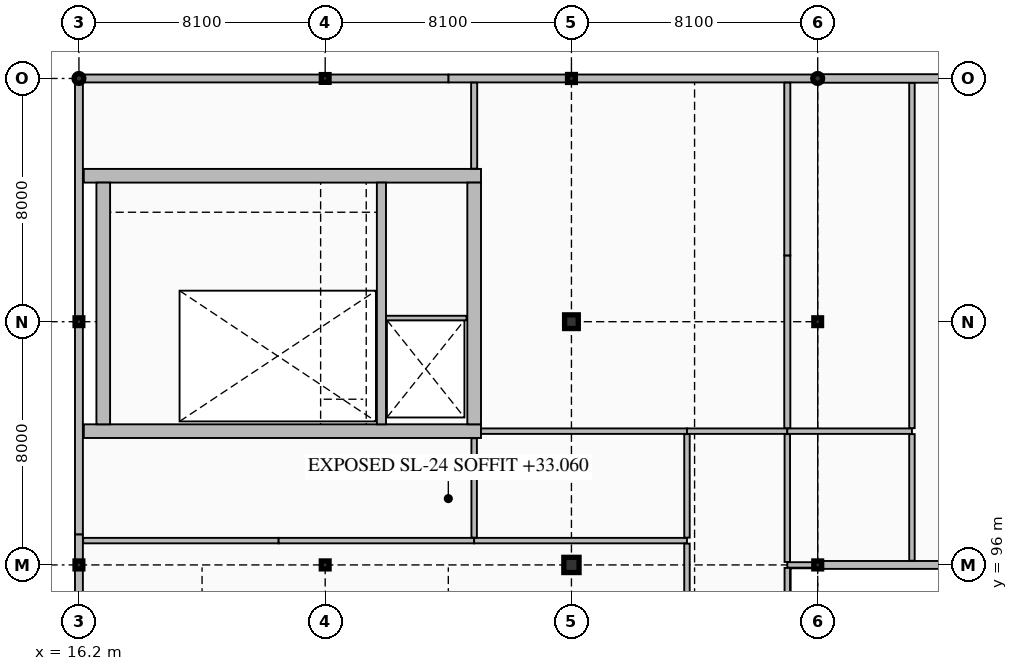
"""IFC4 building model, lengths in metres.
Left out: names, types, materials, properties, quantities, classifications, styles, units other than length and angle.
Written with IfcOpenShell. Run it as: python <this file> out.ifc"""

import sys

from ifc_helpers import new_model, si_unit, direction, frame, frame_2d, origin, origin_2d, place, context, subcontext, project, spatial, rectangle, hollow_rectangle, hollow_circle, i_section, extrude, element, fill, save


model = new_model("IFC4")
c1 = context("Model", 3, precision=1e-05, world=origin(), true_north=direction((0.0, 1.0)))
c2 = subcontext(c1, "Body", "Model", "MODEL_VIEW")
j1 = project(units=[si_unit("LENGTHUNIT", "METRE"), si_unit("PLANEANGLEUNIT", "RADIAN")], contexts=[c1])
p1 = place(None, origin())
s1 = spatial("IfcSite", under=j1, at=p1, CompositionType="ELEMENT")
p2 = place(p1, origin())
s2 = spatial("IfcBuilding", under=s1, at=p2, CompositionType="ELEMENT")
p3 = place(p2, frame((0.0, 0.0, 29.1)))
s3 = spatial("IfcBuildingStorey", under=s2, at=p3, CompositionType="ELEMENT", Elevation=29.1)
p4 = place(p3, frame((16.36, 100.4, 0.0), z_axis=(0.0, 0.0, 1.0), x_axis=(1.0, 0.0, 0.0)))
e1 = element("IfcWall", 1, at=p4, inside=s3, PredefinedType="SHEAR", context=c2, shape_type="SweptSolid", body=[
    extrude(rectangle(XDim=13.065, YDim=0.45, at=frame_2d((6.532, 0.0))), origin(), (0.0, 0.0, 1.0), 4.2),
])
p5 = place(p4, frame((1.39, 0.0, 0.0)))
e2 = element("IfcOpeningElement", 2, at=p5, cuts=e1, PredefinedType="OPENING", context=c2, shape_type="SweptSolid", body=[
    extrude(rectangle(XDim=1.15, YDim=2.25, at=frame_2d((0.575, 1.125))), frame((0.0, 0.235, 0.0), z_axis=(0.0, -1.0, 0.0), x_axis=(1.0, 0.0, 0.0)), (0.0, 0.0, 1.0), 0.47),
])
p6 = place(p4, frame((10.695, 0.0, 0.0)))
e3 = element("IfcOpeningElement", 3, at=p6, cuts=e1, PredefinedType="OPENING", context=c2, shape_type="SweptSolid", body=[
    extrude(rectangle(XDim=1.1, YDim=2.2, at=frame_2d((0.55, 1.1))), frame((0.0, 0.235, 0.0), z_axis=(0.0, -1.0, 0.0), x_axis=(1.0, 0.0, 0.0)), (0.0, 0.0, 1.0), 0.47),
])
p7 = place(p3, frame((16.36, 108.8, 0.0), z_axis=(0.0, 0.0, 1.0), x_axis=(1.0, 0.0, 0.0)))
e4 = element("IfcWall", 4, at=p7, inside=s3, PredefinedType="SHEAR", context=c2, shape_type="SweptSolid", body=[
    extrude(rectangle(XDim=13.065, YDim=0.45, at=frame_2d((6.532, 0.0))), origin(), (0.0, 0.0, 1.0), 4.2),
])
for number, where, z_axis, x_axis in (
    (5, (17.0, 100.625, 0.0), (0.0, 0.0, 1.0), (0.0, 1.0, 0.0)),
    (6, (29.2, 100.625, 0.0), (0.0, 0.0, 1.0), (0.0, 1.0, 0.0)),
):
    element("IfcWall", number, at=place(p3, frame(where, z_axis=z_axis, x_axis=x_axis)), inside=s3, PredefinedType="SHEAR", context=c2, shape_type="SweptSolid", body=[
        extrude(rectangle(XDim=7.95, YDim=0.45, at=frame_2d((3.975, 0.0))), origin(), (0.0, 0.0, 1.0), 4.2),
    ])
p8 = place(p3, frame((26.15, 100.625, 0.0), z_axis=(0.0, 0.0, 1.0), x_axis=(0.0, 1.0, 0.0)))
e7 = element("IfcWall", 7, at=p8, inside=s3, PredefinedType="SHEAR", context=c2, shape_type="SweptSolid", body=[
    extrude(rectangle(XDim=7.95, YDim=0.3, at=frame_2d((3.975, 0.0))), origin(), (0.0, 0.0, 1.0), 4.2),
])
p9 = place(p3, frame((16.2, 96.0, 0.0), z_axis=(0.0, 0.0, 1.0), x_axis=(1.0, 0.0, 0.0)))
e8 = element("IfcColumn", 8, at=p9, inside=s3, PredefinedType="COLUMN", context=c2, shape_type="SweptSolid", body=[
    extrude(i_section(OverallWidth=0.256, OverallDepth=0.26, WebThickness=0.011, FlangeThickness=0.017, FilletRadius=0.013, at=origin_2d()), origin(), (0.0, 0.0, 1.0), 4.2),
])
p10 = place(p3, frame((16.2, 104.0, 0.0), z_axis=(0.0, 0.0, 1.0), x_axis=(1.0, 0.0, 0.0)))
e9 = element("IfcColumn", 9, at=p10, inside=s3, PredefinedType="COLUMN", context=c2, shape_type="SweptSolid", body=[
    extrude(hollow_rectangle(XDim=0.254, YDim=0.254, WallThickness=0.013, InnerFilletRadius=0.013, OuterFilletRadius=0.025, at=origin_2d()), origin(), (0.0, 0.0, 1.0), 4.2),
])
p11 = place(p3, frame((16.2, 112.0, 0.0), z_axis=(0.0, 0.0, 1.0), x_axis=(1.0, 0.0, 0.0)))
e10 = element("IfcColumn", 10, at=p11, inside=s3, PredefinedType="COLUMN", context=c2, shape_type="SweptSolid", body=[
    extrude(hollow_circle(Radius=0.162, WallThickness=0.013, at=origin_2d()), origin(), (0.0, 0.0, 1.0), 4.2),
])
p12 = place(p3, frame((24.3, 96.0, 0.0), z_axis=(0.0, 0.0, 1.0), x_axis=(1.0, 0.0, 0.0)))
e11 = element("IfcColumn", 11, at=p12, inside=s3, PredefinedType="COLUMN", context=c2, shape_type="SweptSolid", body=[
    extrude(i_section(OverallWidth=0.256, OverallDepth=0.26, WebThickness=0.011, FlangeThickness=0.017, FilletRadius=0.013, at=origin_2d()), origin(), (0.0, 0.0, 1.0), 4.2),
])
p13 = place(p3, frame((24.3, 112.0, 0.0), z_axis=(0.0, 0.0, 1.0), x_axis=(1.0, 0.0, 0.0)))
e12 = element("IfcColumn", 12, at=p13, inside=s3, PredefinedType="COLUMN", context=c2, shape_type="SweptSolid", body=[
    extrude(hollow_rectangle(XDim=0.254, YDim=0.254, WallThickness=0.013, InnerFilletRadius=0.013, OuterFilletRadius=0.025, at=origin_2d()), origin(), (0.0, 0.0, 1.0), 4.2),
])
p14 = place(p3, frame((32.4, 96.0, 0.0), z_axis=(0.0, 0.0, 1.0), x_axis=(1.0, 0.0, 0.0)))
e13 = element("IfcColumn", 13, at=p14, inside=s3, PredefinedType="COLUMN", context=c2, shape_type="SweptSolid", body=[
    extrude(rectangle(XDim=0.5, YDim=0.5, at=origin_2d()), origin(), (0.0, 0.0, 1.0), 4.2),
])
p15 = place(p3, frame((32.4, 104.0, 0.0), z_axis=(0.0, 0.0, 1.0), x_axis=(1.0, 0.0, 0.0)))
e14 = element("IfcColumn", 14, at=p15, inside=s3, PredefinedType="COLUMN", context=c2, shape_type="SweptSolid", body=[
    extrude(rectangle(XDim=0.45, YDim=0.45, at=origin_2d()), origin(), (0.0, 0.0, 1.0), 4.2),
])
for number, where, z_axis, x_axis in (
    (15, (32.4, 112.0, 0.0), (0.0, 0.0, 1.0), (1.0, 0.0, 0.0)),
    (16, (40.5, 96.0, 0.0), (0.0, 0.0, 1.0), (1.0, 0.0, 0.0)),
):
    element("IfcColumn", number, at=place(p3, frame(where, z_axis=z_axis, x_axis=x_axis)), inside=s3, PredefinedType="COLUMN", context=c2, shape_type="SweptSolid", body=[
        extrude(i_section(OverallWidth=0.256, OverallDepth=0.26, WebThickness=0.011, FlangeThickness=0.017, FilletRadius=0.013, at=origin_2d()), origin(), (0.0, 0.0, 1.0), 4.2),
    ])
p16 = place(p3, frame((40.5, 104.0, 0.0), z_axis=(0.0, 0.0, 1.0), x_axis=(1.0, 0.0, 0.0)))
e17 = element("IfcColumn", 17, at=p16, inside=s3, PredefinedType="COLUMN", context=c2, shape_type="SweptSolid", body=[
    extrude(hollow_rectangle(XDim=0.254, YDim=0.254, WallThickness=0.013, InnerFilletRadius=0.013, OuterFilletRadius=0.025, at=origin_2d()), origin(), (0.0, 0.0, 1.0), 4.2),
])
p17 = place(p3, frame((40.5, 112.0, 0.0), z_axis=(0.0, 0.0, 1.0), x_axis=(1.0, 0.0, 0.0)))
e18 = element("IfcColumn", 18, at=p17, inside=s3, PredefinedType="COLUMN", context=c2, shape_type="SweptSolid", body=[
    extrude(hollow_circle(Radius=0.162, WallThickness=0.013, at=origin_2d()), origin(), (0.0, 0.0, 1.0), 4.2),
])
p18 = place(p3, frame((40.68, 96.0, 0.0), z_axis=(0.0, 0.0, 1.0), x_axis=(1.0, 0.0, 0.0)))
e19 = element("IfcWall", 19, at=p18, inside=s3, PredefinedType="SOLIDWALL", context=c2, shape_type="SweptSolid", body=[
    extrude(rectangle(XDim=16.11, YDim=0.26, at=frame_2d((8.055, 0.0))), origin(), (0.0, 0.0, 1.0), 3.402),
])
p19 = place(p3, frame((51.3, 112.0, 0.0), z_axis=(0.0, 0.0, 1.0), x_axis=(-1.0, 0.0, 0.0)))
e20 = element("IfcWall", 20, at=p19, inside=s3, PredefinedType="SOLIDWALL", context=c2, shape_type="SweptSolid", body=[
    extrude(rectangle(XDim=10.8, YDim=0.28, at=frame_2d((5.4, 0.0))), origin(), (0.0, 0.0, 1.0), 3.402),
])
p20 = place(p19, frame((4.95, 0.0, 0.95)))
e21 = element("IfcOpeningElement", 21, at=p20, cuts=e20, PredefinedType="OPENING", context=c2, shape_type="SweptSolid", body=[
    extrude(rectangle(XDim=0.9, YDim=1.8, at=frame_2d((0.45, 0.9))), frame((0.0, 0.15, 0.0), z_axis=(0.0, -1.0, 0.0), x_axis=(1.0, 0.0, 0.0)), (0.0, 0.0, 1.0), 0.3),
])
p21 = place(p3, frame((40.5, 112.0, 0.0), z_axis=(0.0, 0.0, 1.0), x_axis=(-1.0, 0.0, 0.0)))
e22 = element("IfcWall", 22, at=p21, inside=s3, PredefinedType="SOLIDWALL", context=c2, shape_type="SweptSolid", body=[
    extrude(rectangle(XDim=12.15, YDim=0.26, at=frame_2d((6.075, 0.0))), origin(), (0.0, 0.0, 1.0), 3.402),
])
p22 = place(p21, frame((5.4, 0.0, 0.85)))
e23 = element("IfcOpeningElement", 23, at=p22, cuts=e22, PredefinedType="OPENING", context=c2, shape_type="SweptSolid", body=[
    extrude(rectangle(XDim=0.9, YDim=2.1, at=frame_2d((0.45, 1.05))), frame((0.0, 0.14, 0.0), z_axis=(0.0, -1.0, 0.0), x_axis=(1.0, 0.0, 0.0)), (0.0, 0.0, 1.0), 0.28),
])
p23 = place(p3, frame((28.35, 112.0, 0.0), z_axis=(0.0, 0.0, 1.0), x_axis=(-1.0, 0.0, 0.0)))
e24 = element("IfcWall", 24, at=p23, inside=s3, PredefinedType="SOLIDWALL", context=c2, shape_type="SweptSolid", body=[
    extrude(rectangle(XDim=12.15, YDim=0.26, at=frame_2d((6.075, 0.0))), origin(), (0.0, 0.0, 1.0), 3.402),
])
for number, where, z_axis, x_axis in (
    (25, (16.2, 112.0, 0.0), (0.0, 0.0, 1.0), (0.0, -1.0, 0.0)),
    (26, (16.2, 97.0, 0.0), (0.0, 0.0, 1.0), (0.0, -1.0, 0.0)),
):
    element("IfcWall", number, at=place(p3, frame(where, z_axis=z_axis, x_axis=x_axis)), inside=s3, PredefinedType="SOLIDWALL", context=c2, shape_type="SweptSolid", body=[
        extrude(rectangle(XDim=15.0, YDim=0.26, at=frame_2d((7.5, 0.0))), origin(), (0.0, 0.0, 1.0), 3.452),
    ])
p24 = place(p3, frame((26.3, 104.12, 0.0), z_axis=(0.0, 0.0, 1.0), x_axis=(1.0, 0.0, 0.0)))
e27 = element("IfcWall", 27, at=p24, inside=s3, PredefinedType="PARTITIONING", context=c2, shape_type="SweptSolid", body=[
    extrude(rectangle(XDim=2.65, YDim=0.15, at=frame_2d((1.325, 0.0))), origin(), (0.0, 0.0, 1.0), 3.96),
])
p25 = place(p3, frame((16.338, 96.8, 0.0), z_axis=(0.0, 0.0, 1.0), x_axis=(1.0, 0.0, 0.0)))
e28 = element("IfcWall", 28, at=p25, inside=s3, PredefinedType="PARTITIONING", context=c2, shape_type="SweptSolid", body=[
    extrude(rectangle(XDim=6.431, YDim=0.18, at=frame_2d((3.216, 0.0))), origin(), (0.0, 0.0, 1.0), 3.96),
])
p26 = place(p3, frame((22.769, 96.8, 0.0), z_axis=(0.0, 0.0, 1.0), x_axis=(1.0, 0.0, 0.0)))
e29 = element("IfcWall", 29, at=p26, inside=s3, PredefinedType="PARTITIONING", context=c2, shape_type="SweptSolid", body=[
    extrude(rectangle(XDim=6.431, YDim=0.18, at=frame_2d((3.215, 0.0))), origin(), (0.0, 0.0, 1.0), 3.96),
])
p27 = place(p3, frame((29.2, 96.8, 0.0), z_axis=(0.0, 0.0, 1.0), x_axis=(1.0, 0.0, 0.0)))
e30 = element("IfcWall", 30, at=p27, inside=s3, PredefinedType="PARTITIONING", context=c2, shape_type="SweptSolid", body=[
    extrude(rectangle(XDim=7.0, YDim=0.18, at=frame_2d((3.5, 0.0))), origin(), (0.0, 0.0, 1.0), 3.96),
])
p28 = place(p3, frame((29.425, 100.4, 0.0), z_axis=(0.0, 0.0, 1.0), x_axis=(1.0, 0.0, 0.0)))
e31 = element("IfcWall", 31, at=p28, inside=s3, PredefinedType="PARTITIONING", context=c2, shape_type="SweptSolid", body=[
    extrude(rectangle(XDim=6.775, YDim=0.18, at=frame_2d((3.387, 0.0))), origin(), (0.0, 0.0, 1.0), 3.96),
])
p29 = place(p28, frame((2.913, 0.0, 0.0)))
e32 = element("IfcOpeningElement", 32, at=p29, cuts=e31, PredefinedType="OPENING", context=c2, shape_type="SweptSolid", body=[
    extrude(rectangle(XDim=0.95, YDim=2.15, at=frame_2d((0.475, 1.075))), frame((0.0, 0.1, 0.0), z_axis=(0.0, -1.0, 0.0), x_axis=(1.0, 0.0, 0.0)), (0.0, 0.0, 1.0), 0.2),
])
p30 = place(p3, frame((36.2, 100.4, 0.0), z_axis=(0.0, 0.0, 1.0), x_axis=(1.0, 0.0, 0.0)))
e33 = element("IfcWall", 33, at=p30, inside=s3, PredefinedType="PARTITIONING", context=c2, shape_type="SweptSolid", body=[
    extrude(rectangle(XDim=3.3, YDim=0.18, at=frame_2d((1.65, 0.0))), origin(), (0.0, 0.0, 1.0), 3.96),
])
p31 = place(p3, frame((39.5, 96.0, 0.0), z_axis=(0.0, 0.0, 1.0), x_axis=(1.0, 0.0, 0.0)))
e34 = element("IfcWall", 34, at=p31, inside=s3, PredefinedType="PARTITIONING", context=c2, shape_type="SweptSolid", body=[
    extrude(rectangle(XDim=0.862, YDim=0.18, at=frame_2d((0.431, 0.0))), origin(), (0.0, 0.0, 1.0), 3.402),
])
p32 = place(p3, frame((39.5, 100.4, 0.0), z_axis=(0.0, 0.0, 1.0), x_axis=(1.0, 0.0, 0.0)))
e35 = element("IfcWall", 35, at=p32, inside=s3, PredefinedType="PARTITIONING", context=c2, shape_type="SweptSolid", body=[
    extrude(rectangle(XDim=4.1, YDim=0.18, at=frame_2d((2.05, 0.0))), origin(), (0.0, 0.0, 1.0), 3.96),
])
p33 = place(p3, frame((29.2, 96.898, 0.0), z_axis=(0.0, 0.0, 1.0), x_axis=(0.0, 1.0, 0.0)))
e36 = element("IfcWall", 36, at=p33, inside=s3, PredefinedType="PARTITIONING", context=c2, shape_type="SweptSolid", body=[
    extrude(rectangle(XDim=3.269, YDim=0.18, at=frame_2d((1.635, 0.0))), origin(), (0.0, 0.0, 1.0), 3.96),
])
p34 = place(p33, frame((1.034, 0.0, 0.0)))
e37 = element("IfcOpeningElement", 37, at=p34, cuts=e36, PredefinedType="OPENING", context=c2, shape_type="SweptSolid", body=[
    extrude(rectangle(XDim=1.2, YDim=2.2, at=frame_2d((0.6, 1.1))), frame((0.0, 0.1, 0.0), z_axis=(0.0, -1.0, 0.0), x_axis=(1.0, 0.0, 0.0)), (0.0, 0.0, 1.0), 0.2),
])
p35 = place(p3, frame((29.2, 109.033, 0.0), z_axis=(0.0, 0.0, 1.0), x_axis=(0.0, 1.0, 0.0)))
e38 = element("IfcWall", 38, at=p35, inside=s3, PredefinedType="PARTITIONING", context=c2, shape_type="SweptSolid", body=[
    extrude(rectangle(XDim=2.829, YDim=0.2, at=frame_2d((1.415, 0.0))), origin(), (0.0, 0.0, 1.0), 3.96),
])
p36 = place(p35, frame((0.915, 0.0, 0.0)))
e39 = element("IfcOpeningElement", 39, at=p36, cuts=e38, PredefinedType="OPENING", context=c2, shape_type="SweptSolid", body=[
    extrude(rectangle(XDim=1.0, YDim=2.2, at=frame_2d((0.5, 1.1))), frame((0.0, 0.11, 0.0), z_axis=(0.0, -1.0, 0.0), x_axis=(1.0, 0.0, 0.0)), (0.0, 0.0, 1.0), 0.22),
])
p37 = place(p3, frame((36.2, 89.608, 0.0), z_axis=(0.0, 0.0, 1.0), x_axis=(0.0, 1.0, 0.0)))
e40 = element("IfcWall", 40, at=p37, inside=s3, PredefinedType="PARTITIONING", context=c2, shape_type="SweptSolid", body=[
    extrude(rectangle(XDim=7.094, YDim=0.18, at=frame_2d((3.547, 0.0))), origin(), (0.0, 0.0, 1.0), 3.545),
])
p38 = place(p37, frame((3.047, 0.0, 0.0)))
e41 = element("IfcOpeningElement", 41, at=p38, cuts=e40, PredefinedType="OPENING", context=c2, shape_type="SweptSolid", body=[
    extrude(rectangle(XDim=1.0, YDim=2.2, at=frame_2d((0.5, 1.1))), frame((0.0, 0.1, 0.0), z_axis=(0.0, -1.0, 0.0), x_axis=(1.0, 0.0, 0.0)), (0.0, 0.0, 1.0), 0.2),
])
p39 = place(p3, frame((36.2, 96.898, 0.0), z_axis=(0.0, 0.0, 1.0), x_axis=(0.0, 1.0, 0.0)))
e42 = element("IfcWall", 42, at=p39, inside=s3, PredefinedType="PARTITIONING", context=c2, shape_type="SweptSolid", body=[
    extrude(rectangle(XDim=3.404, YDim=0.18, at=frame_2d((1.702, 0.0))), origin(), (0.0, 0.0, 1.0), 3.545),
])
p40 = place(p39, frame((1.152, 0.0, 0.0)))
e43 = element("IfcOpeningElement", 43, at=p40, cuts=e42, PredefinedType="OPENING", context=c2, shape_type="SweptSolid", body=[
    extrude(rectangle(XDim=1.1, YDim=2.2, at=frame_2d((0.55, 1.1))), frame((0.0, 0.1, 0.0), z_axis=(0.0, -1.0, 0.0), x_axis=(1.0, 0.0, 0.0)), (0.0, 0.0, 1.0), 0.2),
])
p41 = place(p3, frame((39.5, 89.65, 0.0), z_axis=(0.0, 0.0, 1.0), x_axis=(0.0, 1.0, 0.0)))
e44 = element("IfcWall", 44, at=p41, inside=s3, PredefinedType="PARTITIONING", context=c2, shape_type="SweptSolid", body=[
    extrude(rectangle(XDim=6.252, YDim=0.18, at=frame_2d((3.126, 0.0))), origin(), (0.0, 0.0, 1.0), 3.96),
])
p42 = place(p3, frame((39.5, 96.098, 0.0), z_axis=(0.0, 0.0, 1.0), x_axis=(0.0, 1.0, 0.0)))
e45 = element("IfcWall", 45, at=p42, inside=s3, PredefinedType="PARTITIONING", context=c2, shape_type="SweptSolid", body=[
    extrude(rectangle(XDim=4.204, YDim=0.18, at=frame_2d((2.102, 0.0))), origin(), (0.0, 0.0, 1.0), 3.96),
])
p43 = place(p42, frame((1.502, 0.0, 0.0)))
e46 = element("IfcOpeningElement", 46, at=p43, cuts=e45, PredefinedType="OPENING", context=c2, shape_type="SweptSolid", body=[
    extrude(rectangle(XDim=1.2, YDim=2.2, at=frame_2d((0.6, 1.1))), frame((0.0, 0.1, 0.0), z_axis=(0.0, -1.0, 0.0), x_axis=(1.0, 0.0, 0.0)), (0.0, 0.0, 1.0), 0.2),
])
p44 = place(p3, frame((39.5, 100.498, 0.0), z_axis=(0.0, 0.0, 1.0), x_axis=(0.0, 1.0, 0.0)))
e47 = element("IfcWall", 47, at=p44, inside=s3, PredefinedType="PARTITIONING", context=c2, shape_type="SweptSolid", body=[
    extrude(rectangle(XDim=5.682, YDim=0.2, at=frame_2d((2.841, 0.0))), origin(), (0.0, 0.0, 1.0), 3.96),
])
p45 = place(p3, frame((39.5, 106.18, 0.0), z_axis=(0.0, 0.0, 1.0), x_axis=(0.0, 1.0, 0.0)))
e48 = element("IfcWall", 48, at=p45, inside=s3, PredefinedType="PARTITIONING", context=c2, shape_type="SweptSolid", body=[
    extrude(rectangle(XDim=5.682, YDim=0.2, at=frame_2d((2.841, 0.0))), origin(), (0.0, 0.0, 1.0), 3.96),
])
p46 = place(p3, frame((43.6, 96.138, 0.0), z_axis=(0.0, 0.0, 1.0), x_axis=(0.0, 1.0, 0.0)))
e49 = element("IfcWall", 49, at=p46, inside=s3, PredefinedType="PARTITIONING", context=c2, shape_type="SweptSolid", body=[
    extrude(rectangle(XDim=4.164, YDim=0.18, at=frame_2d((2.082, 0.0))), origin(), (0.0, 0.0, 1.0), 3.96),
])
p47 = place(p46, frame((1.532, 0.0, 0.0)))
e50 = element("IfcOpeningElement", 50, at=p47, cuts=e49, PredefinedType="OPENING", context=c2, shape_type="SweptSolid", body=[
    extrude(rectangle(XDim=1.1, YDim=2.2, at=frame_2d((0.55, 1.1))), frame((0.0, 0.1, 0.0), z_axis=(0.0, -1.0, 0.0), x_axis=(1.0, 0.0, 0.0)), (0.0, 0.0, 1.0), 0.2),
])
p48 = place(p3, frame((43.6, 100.498, 0.0), z_axis=(0.0, 0.0, 1.0), x_axis=(0.0, 1.0, 0.0)))
e51 = element("IfcWall", 51, at=p48, inside=s3, PredefinedType="PARTITIONING", context=c2, shape_type="SweptSolid", body=[
    extrude(rectangle(XDim=11.354, YDim=0.18, at=frame_2d((5.677, 0.0))), origin(), (0.0, 0.0, 1.0), 3.96),
])
p49 = place(p48, frame((5.177, 0.0, 0.0)))
e52 = element("IfcOpeningElement", 52, at=p49, cuts=e51, PredefinedType="OPENING", context=c2, shape_type="SweptSolid", body=[
    extrude(rectangle(XDim=1.0, YDim=2.2, at=frame_2d((0.5, 1.1))), frame((0.0, 0.1, 0.0), z_axis=(0.0, -1.0, 0.0), x_axis=(1.0, 0.0, 0.0)), (0.0, 0.0, 1.0), 0.2),
])
p50 = place(p22, origin())
e53 = element("IfcWindow", 53, at=p50, inside=s3, PartitioningType="SINGLE_PANEL", PredefinedType="WINDOW", context=c2, shape_type="SweptSolid", body=[
    extrude(rectangle(XDim=0.9, YDim=2.1, at=frame_2d((0.45, 1.05))), frame((0.0, 0.03, 0.0), z_axis=(0.0, -1.0, 0.0), x_axis=(1.0, 0.0, 0.0)), (0.0, 0.0, 1.0), 0.06),
])
fill(e23, e53)
p51 = place(p5, origin())
e54 = element("IfcDoor", 54, at=p51, inside=s3, OperationType="SINGLE_SWING_RIGHT", PredefinedType="DOOR", context=c2, shape_type="SweptSolid", body=[
    extrude(rectangle(XDim=1.15, YDim=2.25, at=frame_2d((0.575, 1.125))), frame((0.0, 0.025, 0.0), z_axis=(0.0, -1.0, 0.0), x_axis=(1.0, 0.0, 0.0)), (0.0, 0.0, 1.0), 0.05),
])
fill(e2, e54)
p52 = place(p6, frame((1.1, 0.0, 0.0), z_axis=(0.0, 0.0, 1.0), x_axis=(-1.0, 0.0, 0.0)))
e55 = element("IfcDoor", 55, at=p52, inside=s3, OperationType="DOUBLE_DOOR_SLIDING", PredefinedType="DOOR", context=c2, shape_type="SweptSolid", body=[
    extrude(rectangle(XDim=1.1, YDim=2.2, at=frame_2d((0.55, 1.1))), frame((0.0, 0.025, 0.0), z_axis=(0.0, -1.0, 0.0), x_axis=(1.0, 0.0, 0.0)), (0.0, 0.0, 1.0), 0.05),
])
fill(e3, e55)
p53 = place(p29, origin())
e56 = element("IfcDoor", 56, at=p53, inside=s3, OperationType="SINGLE_SWING_LEFT", PredefinedType="DOOR", context=c2, shape_type="SweptSolid", body=[
    extrude(rectangle(XDim=0.95, YDim=2.15, at=frame_2d((0.475, 1.075))), frame((0.0, 0.025, 0.0), z_axis=(0.0, -1.0, 0.0), x_axis=(1.0, 0.0, 0.0)), (0.0, 0.0, 1.0), 0.05),
])
fill(e32, e56)
p54 = place(p34, frame((1.2, 0.0, 0.0), z_axis=(0.0, 0.0, 1.0), x_axis=(-1.0, 0.0, 0.0)))
e57 = element("IfcDoor", 57, at=p54, inside=s3, OperationType="SINGLE_SWING_RIGHT", PredefinedType="DOOR", context=c2, shape_type="SweptSolid", body=[
    extrude(rectangle(XDim=1.2, YDim=2.2, at=frame_2d((0.6, 1.1))), frame((0.0, 0.025, 0.0), z_axis=(0.0, -1.0, 0.0), x_axis=(1.0, 0.0, 0.0)), (0.0, 0.0, 1.0), 0.05),
])
fill(e37, e57)
p55 = place(p36, origin())
e58 = element("IfcDoor", 58, at=p55, inside=s3, OperationType="SINGLE_SWING_LEFT", PredefinedType="DOOR", context=c2, shape_type="SweptSolid", body=[
    extrude(rectangle(XDim=1.0, YDim=2.2, at=frame_2d((0.5, 1.1))), frame((0.0, 0.025, 0.0), z_axis=(0.0, -1.0, 0.0), x_axis=(1.0, 0.0, 0.0)), (0.0, 0.0, 1.0), 0.05),
])
fill(e39, e58)
p56 = place(p40, origin())
e59 = element("IfcDoor", 59, at=p56, inside=s3, OperationType="SINGLE_SWING_RIGHT", PredefinedType="DOOR", context=c2, shape_type="SweptSolid", body=[
    extrude(rectangle(XDim=1.1, YDim=2.2, at=frame_2d((0.55, 1.1))), frame((0.0, 0.025, 0.0), z_axis=(0.0, -1.0, 0.0), x_axis=(1.0, 0.0, 0.0)), (0.0, 0.0, 1.0), 0.05),
])
fill(e43, e59)
p57 = place(p43, frame((1.2, 0.0, 0.0), z_axis=(0.0, 0.0, 1.0), x_axis=(-1.0, 0.0, 0.0)))
e60 = element("IfcDoor", 60, at=p57, inside=s3, OperationType="SINGLE_SWING_LEFT", PredefinedType="DOOR", context=c2, shape_type="SweptSolid", body=[
    extrude(rectangle(XDim=1.2, YDim=2.2, at=frame_2d((0.6, 1.1))), frame((0.0, 0.025, 0.0), z_axis=(0.0, -1.0, 0.0), x_axis=(1.0, 0.0, 0.0)), (0.0, 0.0, 1.0), 0.05),
])
fill(e46, e60)
p58 = place(p47, origin())
e61 = element("IfcDoor", 61, at=p58, inside=s3, OperationType="SINGLE_SWING_RIGHT", PredefinedType="DOOR", context=c2, shape_type="SweptSolid", body=[
    extrude(rectangle(XDim=1.1, YDim=2.2, at=frame_2d((0.55, 1.1))), frame((0.0, 0.025, 0.0), z_axis=(0.0, -1.0, 0.0), x_axis=(1.0, 0.0, 0.0)), (0.0, 0.0, 1.0), 0.05),
])
fill(e50, e61)
p59 = place(p49, origin())
e62 = element("IfcDoor", 62, at=p59, inside=s3, OperationType="SINGLE_SWING_LEFT", PredefinedType="DOOR", context=c2, shape_type="SweptSolid", body=[
    extrude(rectangle(XDim=1.0, YDim=2.2, at=frame_2d((0.5, 1.1))), frame((0.0, 0.025, 0.0), z_axis=(0.0, -1.0, 0.0), x_axis=(1.0, 0.0, 0.0)), (0.0, 0.0, 1.0), 0.05),
])
fill(e52, e62)
save(model, sys.argv[1])
